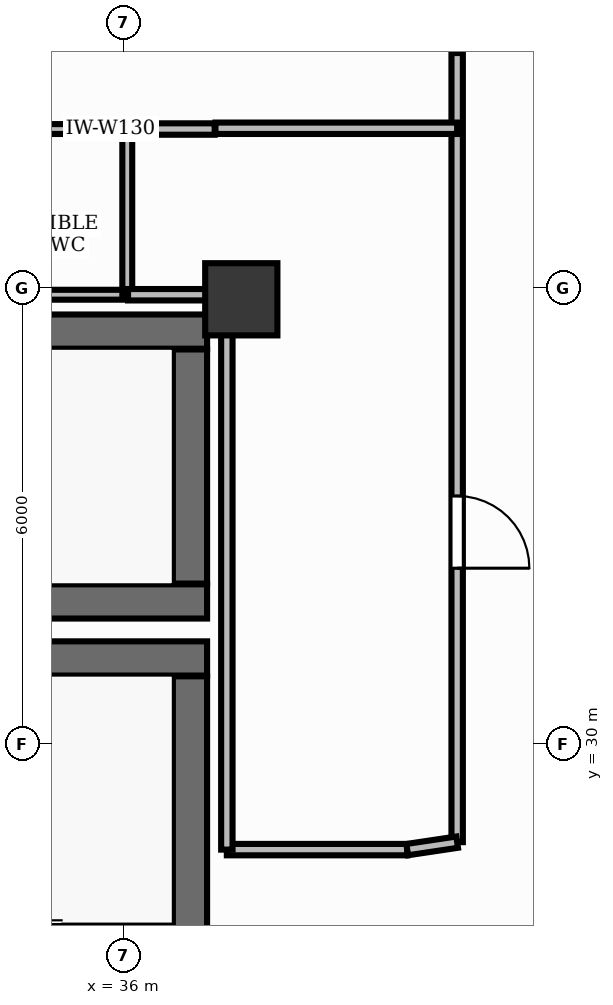
"""IFC4 building model, lengths in metres.
Left out: names, types, materials, properties, quantities, classifications, styles, units other than length and angle.
Written with IfcOpenShell. Run it as: python <this file> out.ifc"""

import sys

from ifc_helpers import new_model, si_unit, direction, frame, frame_2d, origin, origin_2d, place, context, subcontext, project, spatial, rectangle, extrude, element, fill, save


model = new_model("IFC4")
c1 = context("Model", 3, precision=1e-05, world=origin(), true_north=direction((0.0, 1.0)))
c2 = subcontext(c1, "Body", "Model", "MODEL_VIEW")
j1 = project(units=[si_unit("LENGTHUNIT", "METRE"), si_unit("PLANEANGLEUNIT", "RADIAN")], contexts=[c1])
p1 = place(None, origin())
s1 = spatial("IfcSite", under=j1, at=p1, CompositionType="ELEMENT")
p2 = place(p1, origin())
s2 = spatial("IfcBuilding", under=s1, at=p2, CompositionType="ELEMENT")
p3 = place(p2, frame((0.0, 0.0, 76.2)))
s3 = spatial("IfcBuildingStorey", under=s2, at=p3, CompositionType="ELEMENT", Elevation=76.2)
p4 = place(p3, frame((28.852, 35.425, 0.0), z_axis=(0.0, 0.0, 1.0), x_axis=(1.0, 0.0, 0.0)))
e1 = element("IfcWall", 1, at=p4, inside=s3, PredefinedType="SHEAR", context=c2, shape_type="SweptSolid", body=[
    extrude(rectangle(XDim=8.248, YDim=0.45, at=frame_2d((4.124, 0.0))), origin(), (0.0, 0.0, 1.0), 3.9),
])
p5 = place(p3, frame((28.35, 31.875, 0.0), z_axis=(0.0, 0.0, 1.0), x_axis=(1.0, 0.0, 0.0)))
e2 = element("IfcWall", 2, at=p5, inside=s3, PredefinedType="SHEAR", context=c2, shape_type="SweptSolid", body=[
    extrude(rectangle(XDim=8.75, YDim=0.45, at=frame_2d((4.375, 0.0))), origin(), (0.0, 0.0, 1.0), 3.9),
])
p6 = place(p3, frame((36.875, 32.11, 0.0), z_axis=(0.0, 0.0, 1.0), x_axis=(0.0, 1.0, 0.0)))
e3 = element("IfcWall", 3, at=p6, inside=s3, PredefinedType="SHEAR", context=c2, shape_type="SweptSolid", body=[
    extrude(rectangle(XDim=3.08, YDim=0.45, at=frame_2d((1.54, 0.0))), origin(), (0.0, 0.0, 1.0), 3.9),
])
p7 = place(p3, frame((33.1, 31.125, 0.0), z_axis=(0.0, 0.0, 1.0), x_axis=(1.0, 0.0, 0.0)))
e4 = element("IfcWall", 4, at=p7, inside=s3, PredefinedType="SHEAR", context=c2, shape_type="SweptSolid", body=[
    extrude(rectangle(XDim=4.0, YDim=0.45, at=frame_2d((2.0, 0.0))), origin(), (0.0, 0.0, 1.0), 3.9),
])
p8 = place(p3, frame((36.875, 23.11, 0.0), z_axis=(0.0, 0.0, 1.0), x_axis=(0.0, 1.0, 0.0)))
e5 = element("IfcWall", 5, at=p8, inside=s3, PredefinedType="SHEAR", context=c2, shape_type="SweptSolid", body=[
    extrude(rectangle(XDim=7.78, YDim=0.45, at=frame_2d((3.89, 0.0))), origin(), (0.0, 0.0, 1.0), 3.9),
])
p9 = place(p3, frame((37.55, 35.85, -0.0), z_axis=(0.0, 0.0, 1.0), x_axis=(1.0, 0.0, 0.0)))
e6 = element("IfcColumn", 6, at=p9, inside=s3, PredefinedType="PILASTER", context=c2, shape_type="SweptSolid", body=[
    extrude(rectangle(XDim=0.95, YDim=0.95, at=origin_2d()), origin(), (0.0, 0.0, 1.0), 3.901),
])
p10 = place(p3, frame((33.65, 38.09, 0.0), z_axis=(0.0, 0.0, 1.0), x_axis=(1.0, 0.0, 0.0)))
e7 = element("IfcWall", 7, at=p10, inside=s3, PredefinedType="PARTITIONING", context=c2, shape_type="SweptSolid", body=[
    extrude(rectangle(XDim=2.4, YDim=0.13, at=frame_2d((1.2, 0.0))), origin(), (0.0, 0.0, 1.0), 2.91),
])
p11 = place(p10, frame((0.24, 0.0, 0.0)))
e8 = element("IfcOpeningElement", 8, at=p11, cuts=e7, PredefinedType="OPENING", context=c2, shape_type="SweptSolid", body=[
    extrude(rectangle(XDim=0.9, YDim=2.15, at=frame_2d((0.45, 1.075))), frame((0.0, 0.08, 0.0), z_axis=(0.0, -1.0, 0.0), x_axis=(1.0, 0.0, 0.0)), (0.0, 0.0, 1.0), 0.16),
])
p12 = place(p3, frame((40.39, 39.09, 0.0), z_axis=(0.0, 0.0, 1.0), x_axis=(0.0, -1.0, 0.0)))
e9 = element("IfcWall", 9, at=p12, inside=s3, PredefinedType="PARTITIONING", context=c2, shape_type="SweptSolid", body=[
    extrude(rectangle(XDim=10.382, YDim=0.15, at=frame_2d((5.191, 0.0))), origin(), (0.0, 0.0, 1.0), 2.91),
])
p13 = place(p12, frame((5.828, 0.0, 0.0)))
e10 = element("IfcOpeningElement", 10, at=p13, cuts=e9, PredefinedType="OPENING", context=c2, shape_type="SweptSolid", body=[
    extrude(rectangle(XDim=0.95, YDim=2.15, at=frame_2d((0.475, 1.075))), frame((0.0, 0.09, 0.0), z_axis=(0.0, -1.0, 0.0), x_axis=(1.0, 0.0, 0.0)), (0.0, 0.0, 1.0), 0.18),
])
p14 = place(p3, frame((36.05, 35.91, 0.0), z_axis=(0.0, 0.0, 1.0), x_axis=(-1.0, 0.0, 0.0)))
e11 = element("IfcWall", 11, at=p14, inside=s3, PredefinedType="PARTITIONING", context=c2, shape_type="SweptSolid", body=[
    extrude(rectangle(XDim=2.4, YDim=0.13, at=frame_2d((1.2, 0.0))), origin(), (0.0, 0.0, 1.0), 2.91),
])
p15 = place(p3, frame((36.05, 38.09, 0.0), z_axis=(0.0, 0.0, 1.0), x_axis=(0.0, -1.0, 0.0)))
e12 = element("IfcWall", 12, at=p15, inside=s3, PredefinedType="PARTITIONING", context=c2, shape_type="SweptSolid", body=[
    extrude(rectangle(XDim=2.18, YDim=0.13, at=frame_2d((1.09, 0.0))), origin(), (0.0, 0.0, 1.0), 2.91),
])
p16 = place(p3, frame((39.733, 28.61, 0.0), z_axis=(0.0, 0.0, 1.0), x_axis=(-1.0, 0.0, 0.0)))
e13 = element("IfcWall", 13, at=p16, inside=s3, PredefinedType="PARTITIONING", context=c2, shape_type="SweptSolid", body=[
    extrude(rectangle(XDim=2.373, YDim=0.15, at=frame_2d((1.187, 0.0))), origin(), (0.0, 0.0, 1.0), 2.91),
])
p17 = place(p3, frame((37.36, 28.61, 0.0), z_axis=(0.0, 0.0, 1.0), x_axis=(0.0, 1.0, 0.0)))
e14 = element("IfcWall", 14, at=p17, inside=s3, PredefinedType="PARTITIONING", context=c2, shape_type="SweptSolid", body=[
    extrude(rectangle(XDim=7.29, YDim=0.15, at=frame_2d((3.645, 0.0))), origin(), (0.0, 0.0, 1.0), 2.91),
])
p18 = place(p3, frame((37.35, 35.91, 0.0), z_axis=(0.0, 0.0, 1.0), x_axis=(-1.0, 0.0, 0.0)))
e15 = element("IfcWall", 15, at=p18, inside=s3, PredefinedType="PARTITIONING", context=c2, shape_type="SweptSolid", body=[
    extrude(rectangle(XDim=1.29, YDim=0.15, at=frame_2d((0.645, 0.0))), origin(), (0.0, 0.0, 1.0), 2.91),
])
p19 = place(p3, frame((36.06, 38.09, 0.0), z_axis=(0.0, 0.0, 1.0), x_axis=(1.0, 0.0, 0.0)))
e16 = element("IfcWall", 16, at=p19, inside=s3, PredefinedType="PARTITIONING", context=c2, shape_type="SweptSolid", body=[
    extrude(rectangle(XDim=1.14, YDim=0.15, at=frame_2d((0.57, 0.0))), origin(), (0.0, 0.0, 1.0), 2.91),
])
p20 = place(p3, frame((37.21, 38.1, 0.0), z_axis=(0.0, 0.0, 1.0), x_axis=(1.0, 0.0, 0.0)))
e17 = element("IfcWall", 17, at=p20, inside=s3, PredefinedType="PARTITIONING", context=c2, shape_type="SweptSolid", body=[
    extrude(rectangle(XDim=3.18, YDim=0.15, at=frame_2d((1.59, 0.0))), origin(), (0.0, 0.0, 1.0), 2.91),
])
p21 = place(p3, frame((40.39, 28.708, 0.0), z_axis=(0.0, 0.0, 1.0), x_axis=(-0.989025137229, -0.147747344915, 0.0)))
e18 = element("IfcWall", 18, at=p21, inside=s3, PredefinedType="PARTITIONING", context=c2, shape_type="SweptSolid", body=[
    extrude(rectangle(XDim=0.664, YDim=0.15, at=frame_2d((0.332, 0.0))), origin(), (0.0, 0.0, 1.0), 2.91),
])
p22 = place(p13, origin())
e19 = element("IfcDoor", 19, at=p22, inside=s3, OperationType="SINGLE_SWING_RIGHT", PredefinedType="DOOR", context=c2, shape_type="SweptSolid", body=[
    extrude(rectangle(XDim=0.95, YDim=2.15, at=frame_2d((0.475, 1.075))), frame((0.0, 0.025, 0.0), z_axis=(0.0, -1.0, 0.0), x_axis=(1.0, 0.0, 0.0)), (0.0, 0.0, 1.0), 0.05),
])
fill(e10, e19)
save(model, sys.argv[1])
